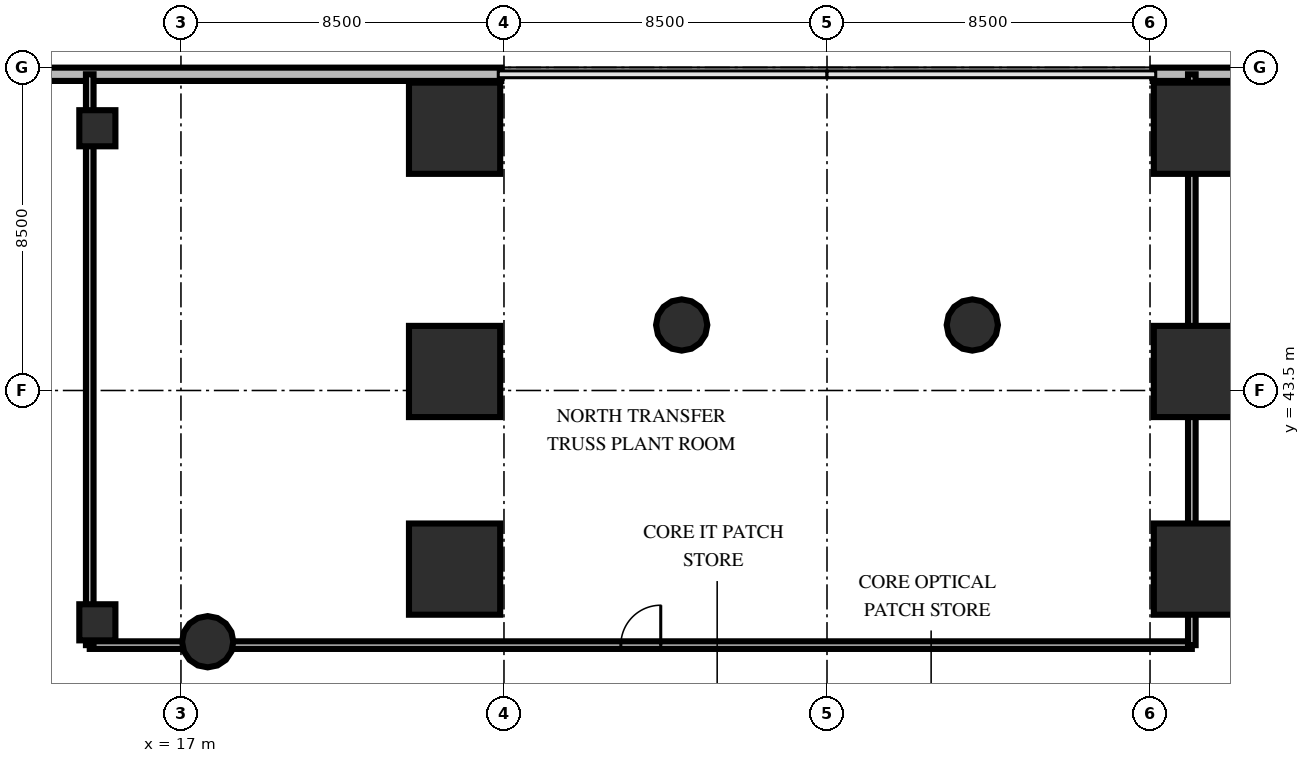
"""IFC4 building model, lengths in metres.
Left out: names, types, materials, properties, quantities, classifications, styles, units other than length and angle.
Written with IfcOpenShell. Run it as: python <this file> out.ifc"""

import sys

from ifc_helpers import new_model, si_unit, direction, frame, frame_2d, origin, origin_2d, place, context, subcontext, project, spatial, rectangle, circle, extrude, element, fill, save


model = new_model("IFC4")
c1 = context("Model", 3, precision=1e-05, world=origin(), true_north=direction((0.0, 1.0)))
c2 = subcontext(c1, "Body", "Model", "MODEL_VIEW")
j1 = project(units=[si_unit("LENGTHUNIT", "METRE"), si_unit("PLANEANGLEUNIT", "RADIAN")], contexts=[c1])
p1 = place(None, origin())
s1 = spatial("IfcSite", under=j1, at=p1, CompositionType="ELEMENT")
p2 = place(p1, origin())
s2 = spatial("IfcBuilding", under=s1, at=p2, CompositionType="ELEMENT")
p3 = place(p2, frame((0.0, 0.0, 15.6)))
s3 = spatial("IfcBuildingStorey", under=s2, at=p3, CompositionType="ELEMENT", Elevation=15.6)
for number, where, z_axis, x_axis in (
    (1, (24.2, 38.8, 0.0), (0.0, 0.0, 1.0), (1.0, 0.0, 0.0)),
    (2, (24.2, 44.0, 0.0), (0.0, 0.0, 1.0), (1.0, 0.0, 0.0)),
    (3, (24.2, 50.4, 0.0), (0.0, 0.0, 1.0), (1.0, 0.0, 0.0)),
    (4, (43.8, 38.8, 0.0), (0.0, 0.0, 1.0), (1.0, 0.0, 0.0)),
    (5, (43.8, 44.0, 0.0), (0.0, 0.0, 1.0), (1.0, 0.0, 0.0)),
    (6, (43.8, 50.4, 0.0), (0.0, 0.0, 1.0), (1.0, 0.0, 0.0)),
):
    element("IfcColumn", number, at=place(p3, frame(where, z_axis=z_axis, x_axis=x_axis)), inside=s3, PredefinedType="USERDEFINED", context=c2, shape_type="SweptSolid", body=[
        extrude(rectangle(XDim=2.4, YDim=2.4, at=origin_2d()), origin(), (0.0, 0.0, 1.0), 4.8),
    ])
for number, where, z_axis, x_axis in (
    (7, (14.8, 37.4, 0.0), (0.0, 0.0, 1.0), (1.0, 0.0, 0.0)),
    (8, (14.8, 50.4, 0.0), (0.0, 0.0, 1.0), (1.0, 0.0, 0.0)),
):
    element("IfcColumn", number, at=place(p3, frame(where, z_axis=z_axis, x_axis=x_axis)), inside=s3, PredefinedType="COLUMN", context=c2, shape_type="SweptSolid", body=[
        extrude(rectangle(XDim=0.95, YDim=0.95, at=origin_2d()), origin(), (0.0, 0.0, 1.0), 4.8),
    ])
for number, where, z_axis, x_axis in (
    (9, (37.824, 45.223, -0.32), (0.0, 0.0, 1.0), (1.0, 0.0, 0.0)),
    (10, (30.176, 45.223, -0.32), (0.0, 0.0, 1.0), (1.0, 0.0, 0.0)),
):
    element("IfcColumn", number, at=place(p3, frame(where, z_axis=z_axis, x_axis=x_axis)), inside=s3, PredefinedType="COLUMN", context=c2, shape_type="SweptSolid", body=[
        extrude(circle(Radius=0.675, at=origin_2d()), origin(), (0.0, 0.0, 1.0), 5.12),
    ])
p4 = place(p3, frame((17.703, 36.889, 0.0), z_axis=(0.0, 0.0, 1.0), x_axis=(1.0, 0.0, 0.0)))
e11 = element("IfcColumn", 11, at=p4, inside=s3, PredefinedType="COLUMN", context=c2, shape_type="SweptSolid", body=[
    extrude(circle(Radius=0.675, at=origin_2d()), origin(), (0.0, 0.0, 1.0), 4.8),
])
p5 = place(p3, frame((0.01, 51.82, 0.0), z_axis=(0.0, 0.0, 1.0), x_axis=(1.0, 0.0, 0.0)))
e12 = element("IfcWall", 12, at=p5, inside=s3, PredefinedType="SOLIDWALL", context=c2, shape_type="SweptSolid", body=[
    extrude(rectangle(XDim=25.42, YDim=0.35, at=frame_2d((12.71, 0.0))), origin(), (0.0, 0.0, 1.0), 3.76),
])
p6 = place(p5, frame((3.2, 0.0, 0.85)))
e13 = element("IfcOpeningElement", 13, at=p6, cuts=e12, PredefinedType="OPENING", context=c2, shape_type="SweptSolid", body=[
    extrude(rectangle(XDim=2.4, YDim=2.4, at=frame_2d((1.2, 1.2))), frame((0.0, 0.185, 0.0), z_axis=(0.0, -1.0, 0.0), x_axis=(1.0, 0.0, 0.0)), (0.0, 0.0, 1.0), 0.37),
])
p7 = place(p3, frame((42.57, 51.82, 0.0), z_axis=(0.0, 0.0, 1.0), x_axis=(1.0, 0.0, 0.0)))
e14 = element("IfcWall", 14, at=p7, inside=s3, PredefinedType="SOLIDWALL", context=c2, shape_type="SweptSolid", body=[
    extrude(rectangle(XDim=25.42, YDim=0.35, at=frame_2d((12.71, 0.0))), origin(), (0.0, 0.0, 1.0), 3.76),
])
p8 = place(p7, frame((13.55, 0.0, 0.85)))
e15 = element("IfcOpeningElement", 15, at=p8, cuts=e14, PredefinedType="OPENING", context=c2, shape_type="SweptSolid", body=[
    extrude(rectangle(XDim=2.4, YDim=2.4, at=frame_2d((1.2, 1.2))), frame((0.0, 0.185, 0.0), z_axis=(0.0, -1.0, 0.0), x_axis=(1.0, 0.0, 0.0)), (0.0, 0.0, 1.0), 0.37),
])
p9 = place(p3, frame((14.6, 36.8, 0.0), z_axis=(0.0, 0.0, 1.0), x_axis=(1.0, 0.0, 0.0)))
e16 = element("IfcWall", 16, at=p9, inside=s3, PredefinedType="SOLIDWALL", context=c2, shape_type="SweptSolid", body=[
    extrude(rectangle(XDim=29.0, YDim=0.2, at=frame_2d((14.5, 0.0))), origin(), (0.0, 0.0, 1.0), 2.61),
])
p10 = place(p9, frame((13.975, 0.0, 0.0)))
e17 = element("IfcOpeningElement", 17, at=p10, cuts=e16, PredefinedType="OPENING", context=c2, shape_type="SweptSolid", body=[
    extrude(rectangle(XDim=1.05, YDim=2.15, at=frame_2d((0.525, 1.075))), frame((0.0, 0.11, 0.0), z_axis=(0.0, -1.0, 0.0), x_axis=(1.0, 0.0, 0.0)), (0.0, 0.0, 1.0), 0.22),
])
for number, where, z_axis, x_axis in (
    (18, (43.6, 36.8, 0.0), (0.0, 0.0, 1.0), (0.0, 1.0, 0.0)),
    (19, (14.6, 51.82, 0.0), (0.0, 0.0, 1.0), (0.0, -1.0, 0.0)),
):
    element("IfcWall", number, at=place(p3, frame(where, z_axis=z_axis, x_axis=x_axis)), inside=s3, PredefinedType="SOLIDWALL", context=c2, shape_type="SweptSolid", body=[
        extrude(rectangle(XDim=15.02, YDim=0.2, at=frame_2d((7.51, 0.0))), origin(), (0.0, 0.0, 1.0), 2.61),
    ])
p11 = place(p10, origin())
e20 = element("IfcDoor", 20, at=p11, inside=s3, OperationType="SINGLE_SWING_RIGHT", PredefinedType="DOOR", context=c2, shape_type="SweptSolid", body=[
    extrude(rectangle(XDim=1.05, YDim=2.15, at=frame_2d((0.525, 1.075))), frame((0.0, 0.025, 0.0), z_axis=(0.0, -1.0, 0.0), x_axis=(1.0, 0.0, 0.0)), (0.0, 0.0, 1.0), 0.05),
])
fill(e17, e20)
save(model, sys.argv[1])
